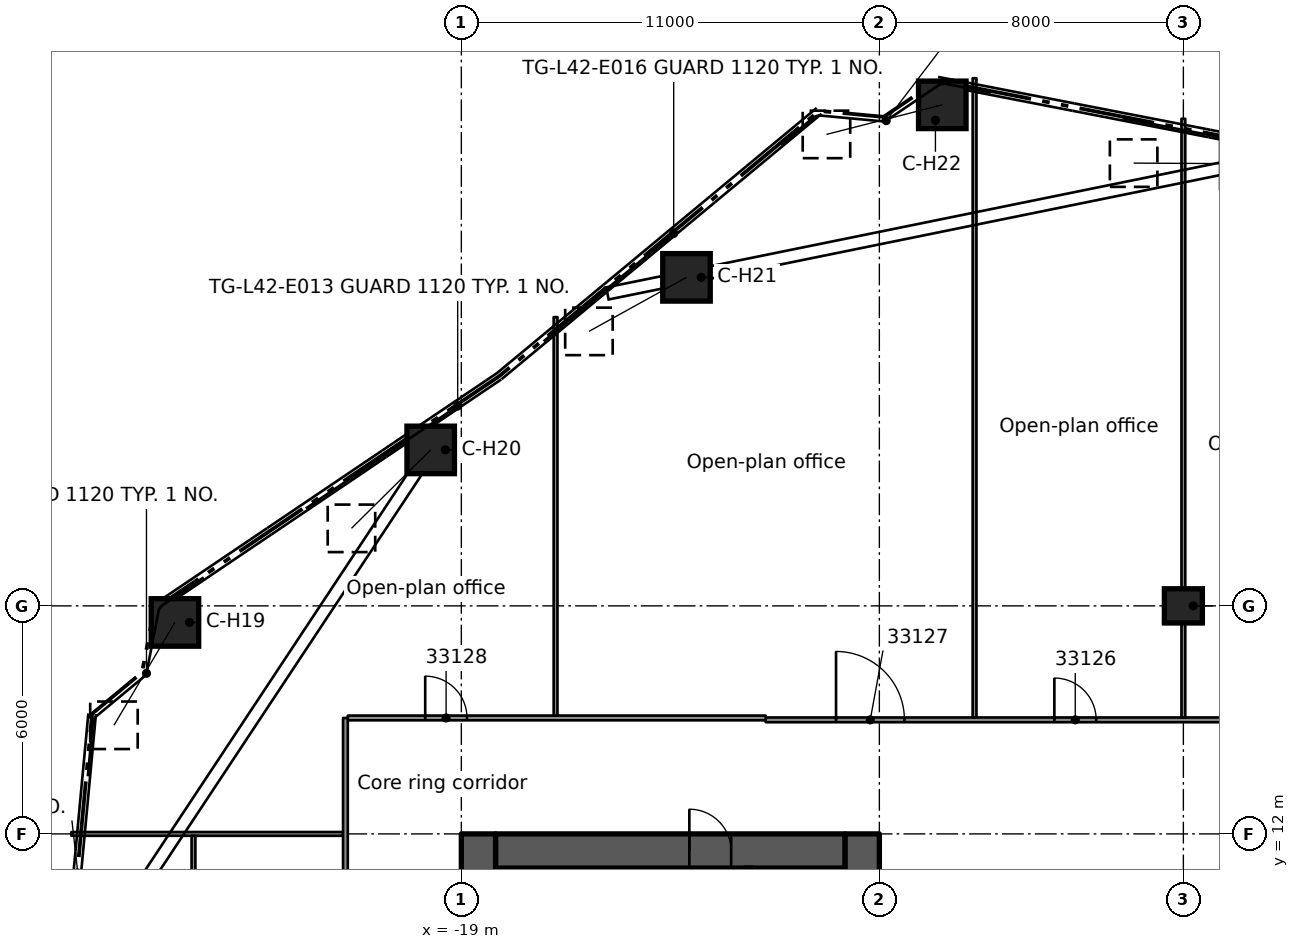
"""IFC4 building model, lengths in metres.
Left out: names, types, materials, properties, quantities, classifications, styles, units other than length and angle.
Written with IfcOpenShell. Run it as: python <this file> out.ifc"""

import sys

from ifc_helpers import new_model, si_unit, direction, frame, frame_2d, origin, origin_2d, place, context, subcontext, project, spatial, rectangle, extrude, element, fill, save


model = new_model("IFC4")
c1 = context("Model", 3, precision=1e-05, world=origin(), true_north=direction((0.0, 1.0)))
c2 = subcontext(c1, "Body", "Model", "MODEL_VIEW")
j1 = project(units=[si_unit("LENGTHUNIT", "METRE"), si_unit("PLANEANGLEUNIT", "RADIAN")], contexts=[c1])
p1 = place(None, origin())
s1 = spatial("IfcSite", under=j1, at=p1, CompositionType="ELEMENT")
p2 = place(p1, origin())
s2 = spatial("IfcBuilding", under=s1, at=p2, CompositionType="ELEMENT")
p3 = place(p2, frame((0.0, 0.0, 163.1)))
s3 = spatial("IfcBuildingStorey", under=s2, at=p3, CompositionType="ELEMENT", Elevation=163.1)
p4 = place(p3, frame((-18.1, 11.55, 0.0), z_axis=(0.0, 0.0, 1.0), x_axis=(1.0, 0.0, 0.0)))
e1 = element("IfcWall", 1, at=p4, inside=s3, PredefinedType="SHEAR", context=c2, shape_type="SweptSolid", body=[
    extrude(rectangle(XDim=9.2, YDim=0.9, at=frame_2d((4.6, 0.0))), origin(), (0.0, 0.0, 1.0), 4.0),
])
p5 = place(p4, frame((5.1, 0.0, 0.0)))
e2 = element("IfcOpeningElement", 2, at=p5, cuts=e1, PredefinedType="OPENING", context=c2, shape_type="SweptSolid", body=[
    extrude(rectangle(XDim=1.1, YDim=2.1, at=frame_2d((0.55, 1.05))), frame((0.0, 0.46, 0.0), z_axis=(0.0, -1.0, 0.0), x_axis=(1.0, 0.0, 0.0)), (0.0, 0.0, 1.0), 0.92),
])
p6 = place(p3, frame((-18.55, -12.0, 0.0), z_axis=(0.0, 0.0, 1.0), x_axis=(0.0, 1.0, 0.0)))
e3 = element("IfcWall", 3, at=p6, inside=s3, PredefinedType="SHEAR", context=c2, shape_type="SweptSolid", body=[
    extrude(rectangle(XDim=24.0, YDim=0.9, at=frame_2d((12.0, 0.0))), origin(), (0.0, 0.0, 1.0), 4.0),
])
p7 = place(p6, frame((10.1, 0.0, 0.0)))
e4 = element("IfcOpeningElement", 4, at=p7, cuts=e3, PredefinedType="OPENING", context=c2, shape_type="SweptSolid", body=[
    extrude(rectangle(XDim=1.8, YDim=2.1, at=frame_2d((0.9, 1.05))), frame((0.0, 0.46, 0.0), z_axis=(0.0, -1.0, 0.0), x_axis=(1.0, 0.0, 0.0)), (0.0, 0.0, 1.0), 0.92),
])
p8 = place(p3, frame((-8.45, -12.0, 0.0), z_axis=(0.0, 0.0, 1.0), x_axis=(0.0, 1.0, 0.0)))
e5 = element("IfcWall", 5, at=p8, inside=s3, PredefinedType="SHEAR", context=c2, shape_type="SweptSolid", body=[
    extrude(rectangle(XDim=24.0, YDim=0.9, at=frame_2d((12.0, 0.0))), origin(), (0.0, 0.0, 1.0), 4.0),
])
p9 = place(p8, frame((9.6, 0.0, 0.0)))
e6 = element("IfcOpeningElement", 6, at=p9, cuts=e5, PredefinedType="OPENING", context=c2, shape_type="SweptSolid", body=[
    extrude(rectangle(XDim=1.8, YDim=2.1, at=frame_2d((0.9, 1.05))), frame((0.0, 0.46, 0.0), z_axis=(0.0, -1.0, 0.0), x_axis=(1.0, 0.0, 0.0)), (0.0, 0.0, 1.0), 0.92),
])
p10 = place(p8, frame((19.65, 0.0, 0.0)))
e7 = element("IfcOpeningElement", 7, at=p10, cuts=e5, PredefinedType="OPENING", context=c2, shape_type="SweptSolid", body=[
    extrude(rectangle(XDim=1.1, YDim=2.1, at=frame_2d((0.55, 1.05))), frame((0.0, 0.46, 0.0), z_axis=(0.0, -1.0, 0.0), x_axis=(1.0, 0.0, 0.0)), (0.0, 0.0, 1.0), 0.92),
])
p11 = place(p3, frame((-26.536, 17.564, 0.444), z_axis=(-0.362783962789, -0.611573755674, 0.70311118446), x_axis=(0.860063310229, -0.510187320891, 0.0)))
e8 = element("IfcColumn", 8, at=p11, inside=s3, PredefinedType="COLUMN", context=c2, shape_type="SweptSolid", body=[
    extrude(rectangle(XDim=1.25, YDim=1.25, at=origin_2d()), origin(), (0.0, 0.0, 1.0), 4.425),
])
p12 = place(p3, frame((-19.806, 22.104, 0.426), z_axis=(-0.484589800455, -0.479653690791, 0.731508757436), x_axis=(0.703477776092, -0.7107172564, 0.0)))
e9 = element("IfcColumn", 9, at=p12, inside=s3, PredefinedType="COLUMN", context=c2, shape_type="SweptSolid", body=[
    extrude(rectangle(XDim=1.25, YDim=1.25, at=origin_2d()), origin(), (0.0, 0.0, 1.0), 4.303),
])
p13 = place(p3, frame((-13.075, 26.644, 0.426), z_axis=(-0.59651445167, -0.33045141997, 0.731418052818), x_axis=(0.484583076291, -0.874745244155, 0.0)))
e10 = element("IfcColumn", 10, at=p13, inside=s3, PredefinedType="COLUMN", context=c2, shape_type="SweptSolid", body=[
    extrude(rectangle(XDim=1.25, YDim=1.25, at=origin_2d()), origin(), (0.0, 0.0, 1.0), 4.303),
])
p14 = place(p3, frame((-6.344, 31.183, 0.444), z_axis=(-0.68893180134, -0.175861085372, 0.703168437683), x_axis=(0.247335189642, -0.968929978876, 0.0)))
e11 = element("IfcColumn", 11, at=p14, inside=s3, PredefinedType="COLUMN", context=c2, shape_type="SweptSolid", body=[
    extrude(rectangle(XDim=1.25, YDim=1.25, at=origin_2d()), origin(), (0.0, 0.0, 1.0), 4.424),
])
p15 = place(p3, frame((1.625, 29.634, 0.426), z_axis=(-0.681844494604, 0.003687792657, 0.731487857291), x_axis=(-0.005408474731, -0.999985374094, 0.0)))
e12 = element("IfcColumn", 12, at=p15, inside=s3, PredefinedType="COLUMN", context=c2, shape_type="SweptSolid", body=[
    extrude(rectangle(XDim=1.25, YDim=1.25, at=origin_2d()), origin(), (0.0, 0.0, 1.0), 4.303),
])
p16 = place(p3, frame((0.0, 18.0, 0.0), z_axis=(0.0, 0.0, 1.0), x_axis=(1.0, 0.0, 0.0)))
e13 = element("IfcColumn", 13, at=p16, inside=s3, PredefinedType="COLUMN", context=c2, shape_type="SweptSolid", body=[
    extrude(rectangle(XDim=1.0, YDim=0.9, at=origin_2d()), origin(), (0.0, 0.0, 1.0), 4.0),
])
p17 = place(p3, frame((-11.44, 6.975, 0.0), z_axis=(0.0, 0.0, 1.0), x_axis=(0.0, 1.0, 0.0)))
e14 = element("IfcWall", 14, at=p17, inside=s3, PredefinedType="SOLIDWALL", context=c2, shape_type="SweptSolid", body=[
    extrude(rectangle(XDim=4.125, YDim=0.2, at=frame_2d((2.062, 0.0))), origin(), (0.0, 0.0, 1.0), 3.58),
])
p18 = place(p17, frame((2.1, 0.0, 0.0)))
e15 = element("IfcOpeningElement", 15, at=p18, cuts=e14, PredefinedType="OPENING", context=c2, shape_type="SweptSolid", body=[
    extrude(rectangle(XDim=1.1, YDim=2.1, at=frame_2d((0.55, 1.05))), frame((0.0, 0.11, 0.0), z_axis=(0.0, -1.0, 0.0), x_axis=(1.0, 0.0, 0.0)), (0.0, 0.0, 1.0), 0.22),
])
p19 = place(p3, frame((-29.261, 12.0, 0.0), z_axis=(0.0, 0.0, 1.0), x_axis=(1.0, 0.0, 0.0)))
e16 = element("IfcWall", 16, at=p19, inside=s3, PredefinedType="PARTITIONING", context=c2, shape_type="SweptSolid", body=[
    extrude(rectangle(XDim=7.148, YDim=0.1, at=frame_2d((3.574, 0.0))), origin(), (0.0, 0.0, 1.0), 3.56),
])
p20 = place(p3, frame((-10.99, 15.001, 0.0), z_axis=(0.0, 0.0, 1.0), x_axis=(1.0, 0.0, 0.0)))
e17 = element("IfcWall", 17, at=p20, inside=s3, PredefinedType="PARTITIONING", context=c2, shape_type="SweptSolid", body=[
    extrude(rectangle(XDim=21.98, YDim=0.125, at=frame_2d((10.99, 0.0))), origin(), (0.0, 0.0, 1.0), 3.56),
])
p21 = place(p20, frame((18.335, 0.0, 0.0)))
e18 = element("IfcOpeningElement", 18, at=p21, cuts=e17, PredefinedType="OPENING", context=c2, shape_type="SweptSolid", body=[
    extrude(rectangle(XDim=1.8, YDim=2.1, at=frame_2d((0.9, 1.05))), frame((0.0, 0.073, 0.0), z_axis=(0.0, -1.0, 0.0), x_axis=(1.0, 0.0, 0.0)), (0.0, 0.0, 1.0), 0.145),
])
p22 = place(p20, frame((13.09, 0.0, 0.0)))
e19 = element("IfcOpeningElement", 19, at=p22, cuts=e17, PredefinedType="OPENING", context=c2, shape_type="SweptSolid", body=[
    extrude(rectangle(XDim=1.1, YDim=2.1, at=frame_2d((0.55, 1.05))), frame((0.0, 0.073, 0.0), z_axis=(0.0, -1.0, 0.0), x_axis=(1.0, 0.0, 0.0)), (0.0, 0.0, 1.0), 0.145),
])
p23 = place(p20, frame((7.595, 0.0, 0.0)))
e20 = element("IfcOpeningElement", 20, at=p23, cuts=e17, PredefinedType="OPENING", context=c2, shape_type="SweptSolid", body=[
    extrude(rectangle(XDim=1.1, YDim=2.1, at=frame_2d((0.55, 1.05))), frame((0.0, 0.073, 0.0), z_axis=(0.0, -1.0, 0.0), x_axis=(1.0, 0.0, 0.0)), (0.0, 0.0, 1.0), 0.145),
])
p24 = place(p20, frame((1.85, 0.0, 0.0)))
e21 = element("IfcOpeningElement", 21, at=p24, cuts=e17, PredefinedType="OPENING", context=c2, shape_type="SweptSolid", body=[
    extrude(rectangle(XDim=1.8, YDim=2.1, at=frame_2d((0.9, 1.05))), frame((0.0, 0.073, 0.0), z_axis=(0.0, -1.0, 0.0), x_axis=(1.0, 0.0, 0.0)), (0.0, 0.0, 1.0), 0.145),
])
p25 = place(p3, frame((-21.988, 15.051, 0.0), z_axis=(0.0, 0.0, 1.0), x_axis=(1.0, 0.0, 0.0)))
e22 = element("IfcWall", 22, at=p25, inside=s3, PredefinedType="PARTITIONING", context=c2, shape_type="SweptSolid", body=[
    extrude(rectangle(XDim=10.997, YDim=0.125, at=frame_2d((5.499, 0.0))), origin(), (0.0, 0.0, 1.0), 3.56),
])
p26 = place(p25, frame((2.038, 0.0, 0.0)))
e23 = element("IfcOpeningElement", 23, at=p26, cuts=e22, PredefinedType="OPENING", context=c2, shape_type="SweptSolid", body=[
    extrude(rectangle(XDim=1.1, YDim=2.1, at=frame_2d((0.55, 1.05))), frame((0.0, 0.073, 0.0), z_axis=(0.0, -1.0, 0.0), x_axis=(1.0, 0.0, 0.0)), (0.0, 0.0, 1.0), 0.145),
])
p27 = place(p3, frame((0.0, 15.063, 0.0), z_axis=(0.0, 0.0, 1.0), x_axis=(0.0, 1.0, 0.0)))
e24 = element("IfcWall", 24, at=p27, inside=s3, PredefinedType="PARTITIONING", context=c2, shape_type="SweptSolid", body=[
    extrude(rectangle(XDim=15.754, YDim=0.1, at=frame_2d((7.877, 0.0))), origin(), (0.0, 0.0, 1.0), 3.56),
])
p28 = place(p3, frame((-5.495, 15.063, 0.0), z_axis=(0.0, 0.0, 1.0), x_axis=(0.0, 1.0, 0.0)))
e25 = element("IfcWall", 25, at=p28, inside=s3, PredefinedType="PARTITIONING", context=c2, shape_type="SweptSolid", body=[
    extrude(rectangle(XDim=16.821, YDim=0.1, at=frame_2d((8.411, 0.0))), origin(), (0.0, 0.0, 1.0), 3.56),
])
p29 = place(p3, frame((-16.52, 15.114, 0.0), z_axis=(0.0, 0.0, 1.0), x_axis=(0.0, 1.0, 0.0)))
e26 = element("IfcWall", 26, at=p29, inside=s3, PredefinedType="PARTITIONING", context=c2, shape_type="SweptSolid", body=[
    extrude(rectangle(XDim=10.484, YDim=0.1, at=frame_2d((5.242, 0.0))), origin(), (0.0, 0.0, 1.0), 3.56),
])
p30 = place(p3, frame((-22.05, -15.051, 0.0), z_axis=(0.0, 0.0, 1.0), x_axis=(0.0, 1.0, 0.0)))
e27 = element("IfcWall", 27, at=p30, inside=s3, PredefinedType="PARTITIONING", context=c2, shape_type="SweptSolid", body=[
    extrude(rectangle(XDim=30.102, YDim=0.125, at=frame_2d((15.051, 0.0))), origin(), (0.0, 0.0, 1.0), 3.56),
])
p31 = place(p30, frame((8.151, 0.0, 0.0)))
e28 = element("IfcOpeningElement", 28, at=p31, cuts=e27, PredefinedType="OPENING", context=c2, shape_type="SweptSolid", body=[
    extrude(rectangle(XDim=1.8, YDim=2.1, at=frame_2d((0.9, 1.05))), frame((0.0, 0.073, 0.0), z_axis=(0.0, -1.0, 0.0), x_axis=(1.0, 0.0, 0.0)), (0.0, 0.0, 1.0), 0.145),
])
p32 = place(p30, frame((0.6, 0.0, 0.0)))
e29 = element("IfcOpeningElement", 29, at=p32, cuts=e27, PredefinedType="OPENING", context=c2, shape_type="SweptSolid", body=[
    extrude(rectangle(XDim=1.8, YDim=2.1, at=frame_2d((0.9, 1.05))), frame((0.0, 0.073, 0.0), z_axis=(0.0, -1.0, 0.0), x_axis=(1.0, 0.0, 0.0)), (0.0, 0.0, 1.0), 0.145),
])
p33 = place(p30, frame((23.652, 0.0, 0.0)))
e30 = element("IfcOpeningElement", 30, at=p33, cuts=e27, PredefinedType="OPENING", context=c2, shape_type="SweptSolid", body=[
    extrude(rectangle(XDim=0.9, YDim=2.1, at=frame_2d((0.45, 1.05))), frame((0.0, 0.073, 0.0), z_axis=(0.0, -1.0, 0.0), x_axis=(1.0, 0.0, 0.0)), (0.0, 0.0, 1.0), 0.145),
])
p34 = place(p30, frame((17.403, 0.0, 0.0)))
e31 = element("IfcOpeningElement", 31, at=p34, cuts=e27, PredefinedType="OPENING", context=c2, shape_type="SweptSolid", body=[
    extrude(rectangle(XDim=1.1, YDim=2.1, at=frame_2d((0.55, 1.05))), frame((0.0, 0.073, 0.0), z_axis=(0.0, -1.0, 0.0), x_axis=(1.0, 0.0, 0.0)), (0.0, 0.0, 1.0), 0.145),
])
p35 = place(p3, frame((-26.048, 6.001, 0.0), z_axis=(0.0, 0.0, 1.0), x_axis=(0.0, 1.0, 0.0)))
e32 = element("IfcWall", 32, at=p35, inside=s3, PredefinedType="PARTITIONING", context=c2, shape_type="SweptSolid", body=[
    extrude(rectangle(XDim=5.949, YDim=0.1, at=frame_2d((2.975, 0.0))), origin(), (0.0, 0.0, 1.0), 3.56),
])
p36 = place(p5, origin())
e33 = element("IfcDoor", 33, at=p36, inside=s3, OperationType="SINGLE_SWING_RIGHT", PredefinedType="DOOR", context=c2, shape_type="SweptSolid", body=[
    extrude(rectangle(XDim=1.1, YDim=2.1, at=frame_2d((0.55, 1.05))), frame((0.0, 0.025, 0.0), z_axis=(0.0, -1.0, 0.0), x_axis=(1.0, 0.0, 0.0)), (0.0, 0.0, 1.0), 0.05),
])
fill(e2, e33)
p37 = place(p23, origin())
e34 = element("IfcDoor", 34, at=p37, inside=s3, OperationType="SINGLE_SWING_LEFT", PredefinedType="DOOR", context=c2, shape_type="SweptSolid", body=[
    extrude(rectangle(XDim=1.1, YDim=2.1, at=frame_2d((0.55, 1.05))), frame((0.0, 0.025, 0.0), z_axis=(0.0, -1.0, 0.0), x_axis=(1.0, 0.0, 0.0)), (0.0, 0.0, 1.0), 0.05),
])
fill(e20, e34)
p38 = place(p24, origin())
e35 = element("IfcDoor", 35, at=p38, inside=s3, OperationType="DOUBLE_DOOR_SINGLE_SWING", PredefinedType="DOOR", context=c2, shape_type="SweptSolid", body=[
    extrude(rectangle(XDim=1.8, YDim=2.1, at=frame_2d((0.9, 1.05))), frame((0.0, 0.025, 0.0), z_axis=(0.0, -1.0, 0.0), x_axis=(1.0, 0.0, 0.0)), (0.0, 0.0, 1.0), 0.05),
])
fill(e21, e35)
p39 = place(p26, origin())
e36 = element("IfcDoor", 36, at=p39, inside=s3, OperationType="SINGLE_SWING_LEFT", PredefinedType="DOOR", context=c2, shape_type="SweptSolid", body=[
    extrude(rectangle(XDim=1.1, YDim=2.1, at=frame_2d((0.55, 1.05))), frame((0.0, 0.025, 0.0), z_axis=(0.0, -1.0, 0.0), x_axis=(1.0, 0.0, 0.0)), (0.0, 0.0, 1.0), 0.05),
])
fill(e23, e36)
save(model, sys.argv[1])
